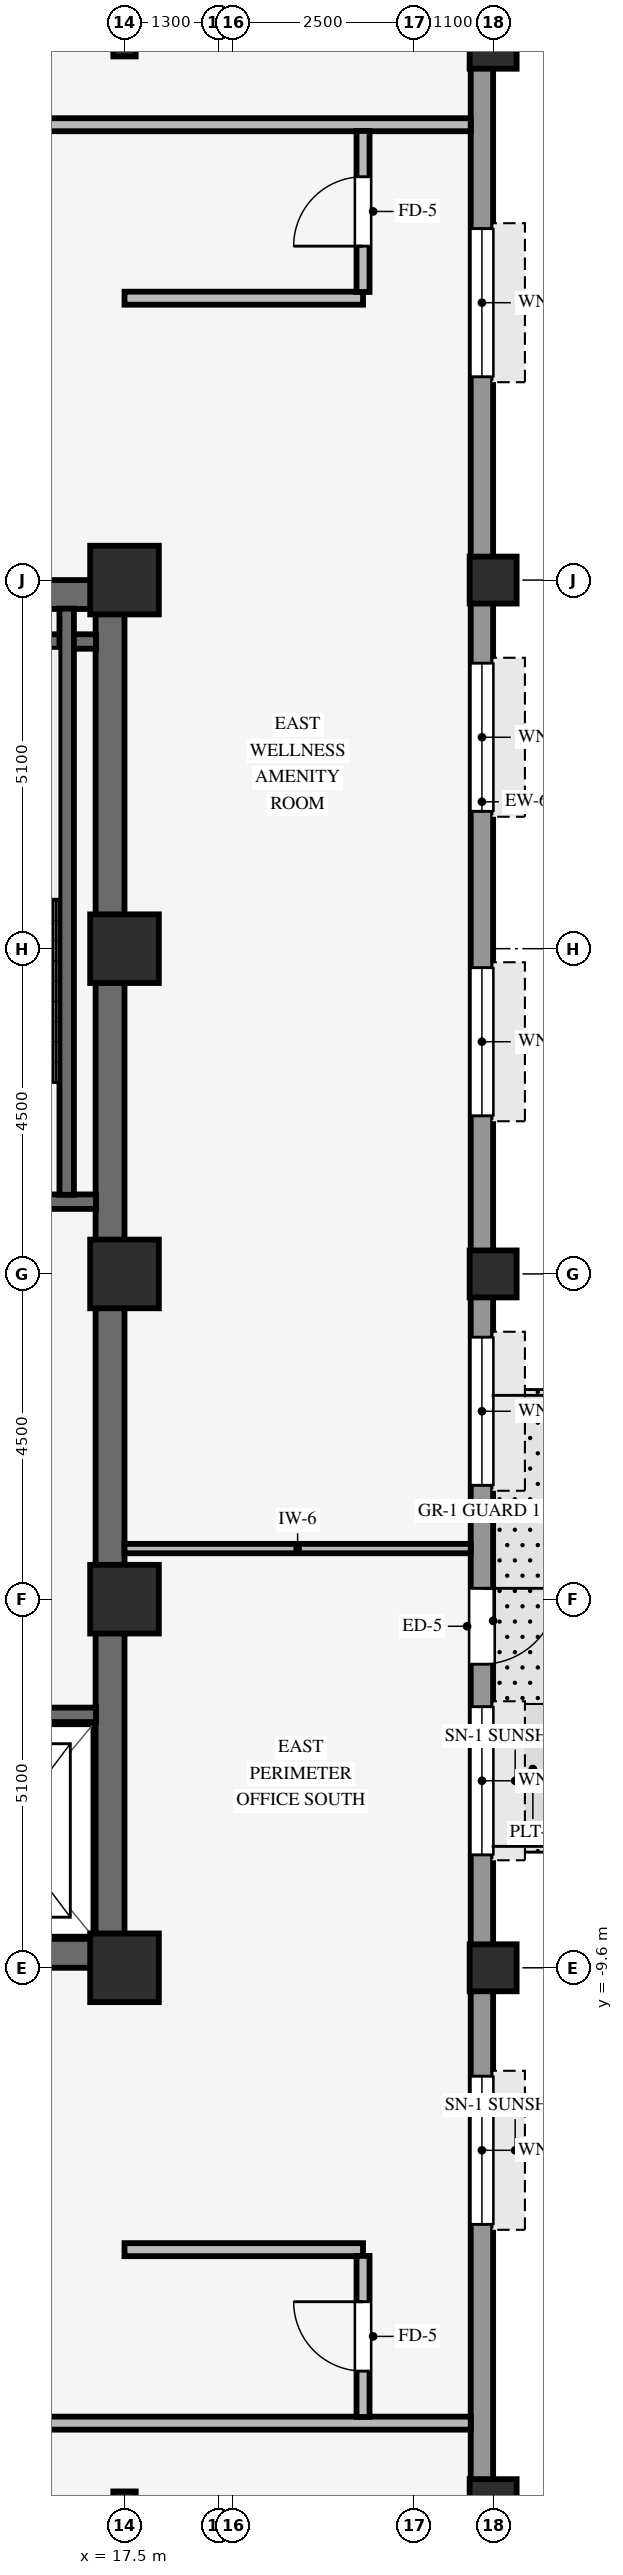
"""IFC4 building model, lengths in metres.
Left out: names, types, materials, properties, quantities, classifications, styles, units other than length and angle.
Written with IfcOpenShell. Run it as: python <this file> out.ifc"""

import sys

from ifc_helpers import new_model, si_unit, direction, frame, frame_2d, origin, origin_2d, place, context, subcontext, project, spatial, rectangle, hollow_rectangle, i_section, extrude, source, transform, mapped, element, fill, save


model = new_model("IFC4")
c1 = context("Model", 3, precision=1e-05, world=origin(), true_north=direction((0.0, 1.0)))
c2 = subcontext(c1, "Body", "Model", "MODEL_VIEW")
j1 = project(units=[si_unit("LENGTHUNIT", "METRE"), si_unit("PLANEANGLEUNIT", "RADIAN")], contexts=[c1])
p1 = place(None, origin())
s1 = spatial("IfcSite", under=j1, at=p1, CompositionType="ELEMENT")
p2 = place(p1, origin())
s2 = spatial("IfcBuilding", under=s1, at=p2, CompositionType="ELEMENT")
p3 = place(p2, frame((0.0, 0.0, 167.65)))
s3 = spatial("IfcBuildingStorey", under=s2, at=p3, CompositionType="ELEMENT", Elevation=167.65)
for number, where, z_axis, x_axis in (
    (1, (9.0, -9.4, 0.0), (0.0, 0.0, 1.0), (1.0, 0.0, 0.0)),
    (2, (9.0, 9.4, 0.0), (0.0, 0.0, 1.0), (1.0, 0.0, 0.0)),
):
    element("IfcWall", number, at=place(p3, frame(where, z_axis=z_axis, x_axis=x_axis)), inside=s3, PredefinedType="SHEAR", context=c2, shape_type="SweptSolid", body=[
        extrude(rectangle(XDim=8.5, YDim=0.4, at=frame_2d((4.25, 0.0))), origin(), (0.0, 0.0, 1.0), 3.37),
    ])
p4 = place(p3, frame((17.3, -9.205, 0.0), z_axis=(0.0, 0.0, 1.0), x_axis=(0.0, 1.0, 0.0)))
e3 = element("IfcWall", 3, at=p4, inside=s3, PredefinedType="SHEAR", context=c2, shape_type="SweptSolid", body=[
    extrude(rectangle(XDim=18.41, YDim=0.4, at=frame_2d((9.205, 0.0))), origin(), (0.0, 0.0, 1.0), 3.37),
])
for number, where, z_axis, x_axis in (
    (4, (17.5, -9.6, 0.0), (0.0, 0.0, 1.0), (1.0, 0.0, 0.0)),
    (5, (17.5, -4.5, 0.0), (0.0, 0.0, 1.0), (1.0, 0.0, 0.0)),
    (6, (17.5, 4.5, 0.0), (0.0, 0.0, 1.0), (1.0, 0.0, 0.0)),
    (7, (17.5, 9.6, 0.0), (0.0, 0.0, 1.0), (1.0, 0.0, 0.0)),
    (8, (17.5, 0.0, 0.0), (0.0, 0.0, 1.0), (1.0, 0.0, 0.0)),
):
    element("IfcColumn", number, at=place(p3, frame(where, z_axis=z_axis, x_axis=x_axis)), inside=s3, PredefinedType="COLUMN", context=c2, shape_type="SweptSolid", body=[
        extrude(rectangle(XDim=0.95, YDim=0.95, at=origin_2d()), origin(), (0.0, 0.0, 1.0), 3.37),
    ])
for number, where, z_axis, x_axis in (
    (9, (22.6, -17.0, -0.4), (0.0, 0.0, 1.0), (1.0, 0.0, 0.0)),
    (10, (22.6, -9.6, -0.4), (0.0, 0.0, 1.0), (1.0, 0.0, 0.0)),
    (11, (22.6, 0.0, -0.4), (0.0, 0.0, 1.0), (1.0, 0.0, 0.0)),
    (12, (22.6, 9.6, -0.4), (0.0, 0.0, 1.0), (1.0, 0.0, 0.0)),
    (13, (22.6, 17.0, -0.4), (0.0, 0.0, 1.0), (1.0, 0.0, 0.0)),
):
    element("IfcColumn", number, at=place(p3, frame(where, z_axis=z_axis, x_axis=x_axis)), inside=s3, PredefinedType="COLUMN", context=c2, shape_type="SweptSolid", body=[
        extrude(hollow_rectangle(XDim=0.65, YDim=0.65, WallThickness=0.04, InnerFilletRadius=0.04, OuterFilletRadius=0.08, at=origin_2d()), origin(), (0.0, 0.0, 1.0), 3.77),
    ])
for number, where, z_axis, x_axis in (
    (14, (17.5, -17.0, 0.0), (0.0, 0.0, 1.0), (1.0, 0.0, 0.0)),
    (15, (17.5, 17.0, 0.0), (0.0, 0.0, 1.0), (1.0, 0.0, 0.0)),
):
    element("IfcColumn", number, at=place(p3, frame(where, z_axis=z_axis, x_axis=x_axis)), inside=s3, PredefinedType="COLUMN", context=c2, shape_type="SweptSolid", body=[
        extrude(i_section(OverallWidth=0.31, OverallDepth=0.31, WebThickness=0.015, FlangeThickness=0.015, FilletRadius=0.015, at=origin_2d()), origin(), (0.0, 0.0, 1.0), 3.37),
    ])
p5 = place(p3, frame((22.445, -20.794, 0.0), z_axis=(0.0, 0.0, 1.0), x_axis=(0.0, 1.0, 0.0)))
e16 = element("IfcWall", 16, at=p5, inside=s3, PredefinedType="STANDARD", context=c2, shape_type="SweptSolid", body=[
    extrude(rectangle(XDim=37.788, YDim=0.31, at=frame_2d((18.894, 0.0))), origin(), (0.0, 0.0, 1.0), 2.705),
])
p6 = place(p5, frame((16.444, 0.0, 0.0), z_axis=(0.0, 0.0, 1.0), x_axis=(-1.0, 0.0, 0.0)))
e17 = element("IfcOpeningElement", 17, at=p6, cuts=e16, PredefinedType="OPENING", context=c2, shape_type="SweptSolid", body=[
    extrude(rectangle(XDim=1.05, YDim=2.1, at=frame_2d((0.525, 1.05))), frame((0.0, 0.165, 0.0), z_axis=(0.0, -1.0, 0.0), x_axis=(1.0, 0.0, 0.0)), (0.0, 0.0, 1.0), 0.33),
])
p7 = place(p5, frame((7.644, 0.0, 0.8)))
e18 = element("IfcOpeningElement", 18, at=p7, cuts=e16, PredefinedType="OPENING", context=c2, shape_type="SweptSolid", body=[
    extrude(rectangle(XDim=2.05, YDim=1.52, at=frame_2d((1.025, 0.76))), frame((0.0, 0.165, 0.0), z_axis=(0.0, -1.0, 0.0), x_axis=(1.0, 0.0, 0.0)), (0.0, 0.0, 1.0), 0.33),
])
p8 = place(p5, frame((12.756, 0.0, 0.8)))
e19 = element("IfcOpeningElement", 19, at=p8, cuts=e16, PredefinedType="OPENING", context=c2, shape_type="SweptSolid", body=[
    extrude(rectangle(XDim=2.05, YDim=1.52, at=frame_2d((1.025, 0.76))), frame((0.0, 0.165, 0.0), z_axis=(0.0, -1.0, 0.0), x_axis=(1.0, 0.0, 0.0)), (0.0, 0.0, 1.0), 0.33),
])
p9 = place(p5, frame((17.869, 0.0, 0.8)))
e20 = element("IfcOpeningElement", 20, at=p9, cuts=e16, PredefinedType="OPENING", context=c2, shape_type="SweptSolid", body=[
    extrude(rectangle(XDim=2.05, YDim=1.52, at=frame_2d((1.025, 0.76))), frame((0.0, 0.165, 0.0), z_axis=(0.0, -1.0, 0.0), x_axis=(1.0, 0.0, 0.0)), (0.0, 0.0, 1.0), 0.33),
])
p10 = place(p5, frame((22.982, 0.0, 0.8)))
e21 = element("IfcOpeningElement", 21, at=p10, cuts=e16, PredefinedType="OPENING", context=c2, shape_type="SweptSolid", body=[
    extrude(rectangle(XDim=2.05, YDim=1.52, at=frame_2d((1.025, 0.76))), frame((0.0, 0.165, 0.0), z_axis=(0.0, -1.0, 0.0), x_axis=(1.0, 0.0, 0.0)), (0.0, 0.0, 1.0), 0.33),
])
p11 = place(p5, frame((27.194, 0.0, 0.8)))
e22 = element("IfcOpeningElement", 22, at=p11, cuts=e16, PredefinedType="OPENING", context=c2, shape_type="SweptSolid", body=[
    extrude(rectangle(XDim=2.05, YDim=1.52, at=frame_2d((1.025, 0.76))), frame((0.0, 0.165, 0.0), z_axis=(0.0, -1.0, 0.0), x_axis=(1.0, 0.0, 0.0)), (0.0, 0.0, 1.0), 0.33),
])
p12 = place(p5, frame((33.207, 0.0, 0.8)))
e23 = element("IfcOpeningElement", 23, at=p12, cuts=e16, PredefinedType="OPENING", context=c2, shape_type="SweptSolid", body=[
    extrude(rectangle(XDim=2.05, YDim=1.52, at=frame_2d((1.025, 0.76))), frame((0.0, 0.165, 0.0), z_axis=(0.0, -1.0, 0.0), x_axis=(1.0, 0.0, 0.0)), (0.0, 0.0, 1.0), 0.33),
])
for number, where, z_axis, x_axis in (
    (24, (13.535, 1.0, 0.0), (0.0, 0.0, 1.0), (1.0, 0.0, 0.0)),
    (25, (13.535, 8.75, 0.0), (0.0, 0.0, 1.0), (1.0, 0.0, 0.0)),
):
    element("IfcWall", number, at=place(p3, frame(where, z_axis=z_axis, x_axis=x_axis)), inside=s3, PredefinedType="SHEAR", context=c2, shape_type="SweptSolid", body=[
        extrude(rectangle(XDim=3.57, YDim=0.2, at=frame_2d((1.785, 0.0))), origin(), (0.0, 0.0, 1.0), 3.37),
    ])
p13 = place(p3, frame((16.7, 1.095, 0.0), z_axis=(0.0, 0.0, 1.0), x_axis=(0.0, 1.0, 0.0)))
e26 = element("IfcWall", 26, at=p13, inside=s3, PredefinedType="SHEAR", context=c2, shape_type="SweptSolid", body=[
    extrude(rectangle(XDim=8.11, YDim=0.2, at=frame_2d((4.055, 0.0))), origin(), (0.0, 0.0, 1.0), 3.37),
])
p14 = place(p3, frame((14.645, -6.1, 0.0), z_axis=(0.0, 0.0, 1.0), x_axis=(1.0, 0.0, 0.0)))
e27 = element("IfcWall", 27, at=p14, inside=s3, PredefinedType="SHEAR", context=c2, shape_type="SweptSolid", body=[
    extrude(rectangle(XDim=2.46, YDim=0.2, at=frame_2d((1.23, 0.0))), origin(), (0.0, 0.0, 1.0), 3.37),
])
p15 = place(p3, frame((-26.09, -15.9, 0.0), z_axis=(0.0, 0.0, 1.0), x_axis=(1.0, 0.0, 0.0)))
e28 = element("IfcWall", 28, at=p15, inside=s3, PredefinedType="PARTITIONING", context=c2, shape_type="SweptSolid", body=[
    extrude(rectangle(XDim=48.38, YDim=0.18, at=frame_2d((24.19, 0.0))), origin(), (0.0, 0.0, 1.0), 3.36),
])
p16 = place(p15, frame((23.31, 0.0, 0.0)))
e29 = element("IfcOpeningElement", 29, at=p16, cuts=e28, PredefinedType="OPENING", context=c2, shape_type="SweptSolid", body=[
    extrude(rectangle(XDim=0.96, YDim=2.1, at=frame_2d((0.48, 1.05))), frame((0.0, 0.1, 0.0), z_axis=(0.0, -1.0, 0.0), x_axis=(1.0, 0.0, 0.0)), (0.0, 0.0, 1.0), 0.2),
])
p17 = place(p15, frame((11.16, 0.0, 0.0)))
e30 = element("IfcOpeningElement", 30, at=p17, cuts=e28, PredefinedType="OPENING", context=c2, shape_type="SweptSolid", body=[
    extrude(rectangle(XDim=0.96, YDim=2.1, at=frame_2d((0.48, 1.05))), frame((0.0, 0.1, 0.0), z_axis=(0.0, -1.0, 0.0), x_axis=(1.0, 0.0, 0.0)), (0.0, 0.0, 1.0), 0.2),
])
p18 = place(p3, frame((17.5, -13.5, 0.0), z_axis=(0.0, 0.0, 1.0), x_axis=(1.0, 0.0, 0.0)))
e31 = element("IfcWall", 31, at=p18, inside=s3, PredefinedType="PARTITIONING", context=c2, shape_type="SweptSolid", body=[
    extrude(rectangle(XDim=3.3, YDim=0.18, at=frame_2d((1.65, 0.0))), origin(), (0.0, 0.0, 1.0), 3.008),
])
p19 = place(p3, frame((17.5, -3.8, 0.0), z_axis=(0.0, 0.0, 1.0), x_axis=(1.0, 0.0, 0.0)))
e32 = element("IfcWall", 32, at=p19, inside=s3, PredefinedType="PARTITIONING", context=c2, shape_type="SweptSolid", body=[
    extrude(rectangle(XDim=4.79, YDim=0.13, at=frame_2d((2.395, 0.0))), origin(), (0.0, 0.0, 1.0), 3.36),
])
p20 = place(p3, frame((17.5, 13.5, 0.0), z_axis=(0.0, 0.0, 1.0), x_axis=(1.0, 0.0, 0.0)))
e33 = element("IfcWall", 33, at=p20, inside=s3, PredefinedType="PARTITIONING", context=c2, shape_type="SweptSolid", body=[
    extrude(rectangle(XDim=3.3, YDim=0.18, at=frame_2d((1.65, 0.0))), origin(), (0.0, 0.0, 1.0), 3.008),
])
p21 = place(p3, frame((-26.09, 15.9, 0.0), z_axis=(0.0, 0.0, 1.0), x_axis=(1.0, 0.0, 0.0)))
e34 = element("IfcWall", 34, at=p21, inside=s3, PredefinedType="PARTITIONING", context=c2, shape_type="SweptSolid", body=[
    extrude(rectangle(XDim=48.38, YDim=0.18, at=frame_2d((24.19, 0.0))), origin(), (0.0, 0.0, 1.0), 3.36),
])
p22 = place(p21, frame((18.12, 0.0, 0.0)))
e35 = element("IfcOpeningElement", 35, at=p22, cuts=e34, PredefinedType="OPENING", context=c2, shape_type="SweptSolid", body=[
    extrude(rectangle(XDim=0.96, YDim=2.1, at=frame_2d((0.48, 1.05))), frame((0.0, 0.1, 0.0), z_axis=(0.0, -1.0, 0.0), x_axis=(1.0, 0.0, 0.0)), (0.0, 0.0, 1.0), 0.2),
])
p23 = place(p21, frame((40.915, 0.0, 0.0)))
e36 = element("IfcOpeningElement", 36, at=p23, cuts=e34, PredefinedType="OPENING", context=c2, shape_type="SweptSolid", body=[
    extrude(rectangle(XDim=0.96, YDim=2.1, at=frame_2d((0.48, 1.05))), frame((0.0, 0.1, 0.0), z_axis=(0.0, -1.0, 0.0), x_axis=(1.0, 0.0, 0.0)), (0.0, 0.0, 1.0), 0.2),
])
p24 = place(p21, frame((28.585, 0.0, 0.0)))
e37 = element("IfcOpeningElement", 37, at=p24, cuts=e34, PredefinedType="OPENING", context=c2, shape_type="SweptSolid", body=[
    extrude(rectangle(XDim=0.96, YDim=2.1, at=frame_2d((0.48, 1.05))), frame((0.0, 0.1, 0.0), z_axis=(0.0, -1.0, 0.0), x_axis=(1.0, 0.0, 0.0)), (0.0, 0.0, 1.0), 0.2),
])
p25 = place(p21, frame((9.595, 0.0, 0.0)))
e38 = element("IfcOpeningElement", 38, at=p25, cuts=e34, PredefinedType="OPENING", context=c2, shape_type="SweptSolid", body=[
    extrude(rectangle(XDim=0.96, YDim=2.1, at=frame_2d((0.48, 1.05))), frame((0.0, 0.1, 0.0), z_axis=(0.0, -1.0, 0.0), x_axis=(1.0, 0.0, 0.0)), (0.0, 0.0, 1.0), 0.2),
])
p26 = place(p3, frame((20.8, -15.814, 0.0), z_axis=(0.0, 0.0, 1.0), x_axis=(0.0, 1.0, 0.0)))
e39 = element("IfcWall", 39, at=p26, inside=s3, PredefinedType="PARTITIONING", context=c2, shape_type="SweptSolid", body=[
    extrude(rectangle(XDim=2.228, YDim=0.18, at=frame_2d((1.114, 0.0))), origin(), (0.0, 0.0, 1.0), 3.36),
])
p27 = place(p26, frame((0.634, 0.0, 0.0)))
e40 = element("IfcOpeningElement", 40, at=p27, cuts=e39, PredefinedType="OPENING", context=c2, shape_type="SweptSolid", body=[
    extrude(rectangle(XDim=0.96, YDim=2.1, at=frame_2d((0.48, 1.05))), frame((0.0, 0.1, 0.0), z_axis=(0.0, -1.0, 0.0), x_axis=(1.0, 0.0, 0.0)), (0.0, 0.0, 1.0), 0.2),
])
p28 = place(p3, frame((20.8, 13.586, 0.0), z_axis=(0.0, 0.0, 1.0), x_axis=(0.0, 1.0, 0.0)))
e41 = element("IfcWall", 41, at=p28, inside=s3, PredefinedType="PARTITIONING", context=c2, shape_type="SweptSolid", body=[
    extrude(rectangle(XDim=2.228, YDim=0.18, at=frame_2d((1.114, 0.0))), origin(), (0.0, 0.0, 1.0), 3.36),
])
p29 = place(p28, frame((0.634, 0.0, 0.0)))
e42 = element("IfcOpeningElement", 42, at=p29, cuts=e41, PredefinedType="OPENING", context=c2, shape_type="SweptSolid", body=[
    extrude(rectangle(XDim=0.96, YDim=2.1, at=frame_2d((0.48, 1.05))), frame((0.0, 0.1, 0.0), z_axis=(0.0, -1.0, 0.0), x_axis=(1.0, 0.0, 0.0)), (0.0, 0.0, 1.0), 0.2),
])
m1 = source(origin(), c2, "Body", "SweptSolid", [
    extrude(rectangle(XDim=1.05, YDim=2.1, at=frame_2d((0.525, 1.05))), frame((0.0, 0.025, 0.0), z_axis=(0.0, -1.0, 0.0), x_axis=(1.0, 0.0, 0.0)), (0.0, 0.0, 1.0), 0.05),
])
p30 = place(p6, origin())
e43 = element("IfcDoor", 43, at=p30, inside=s3, OperationType="SINGLE_SWING_LEFT", PredefinedType="DOOR", context=c2, shape_type="MappedRepresentation", body=[
    mapped(m1, transform((0.0, 0.0, 0.0), scale=1.0)),
])
fill(e17, e43)
m2 = source(origin(), c2, "Body", "SweptSolid", [
    extrude(rectangle(XDim=2.05, YDim=1.52, at=frame_2d((1.025, 0.76))), frame((0.0, 0.03, 0.0), z_axis=(0.0, -1.0, 0.0), x_axis=(1.0, 0.0, 0.0)), (0.0, 0.0, 1.0), 0.06),
])
p31 = place(p7, origin())
e44 = element("IfcWindow", 44, at=p31, inside=s3, PartitioningType="SINGLE_PANEL", PredefinedType="WINDOW", context=c2, shape_type="MappedRepresentation", body=[
    mapped(m2, transform((0.0, 0.0, 0.0), scale=1.0)),
])
fill(e18, e44)
p32 = place(p8, origin())
e45 = element("IfcWindow", 45, at=p32, inside=s3, PartitioningType="SINGLE_PANEL", PredefinedType="WINDOW", context=c2, shape_type="MappedRepresentation", body=[
    mapped(m2, transform((0.0, 0.0, 0.0), scale=1.0)),
])
fill(e19, e45)
p33 = place(p9, origin())
e46 = element("IfcWindow", 46, at=p33, inside=s3, PartitioningType="SINGLE_PANEL", PredefinedType="WINDOW", context=c2, shape_type="MappedRepresentation", body=[
    mapped(m2, transform((0.0, 0.0, 0.0), scale=1.0)),
])
fill(e20, e46)
p34 = place(p10, origin())
e47 = element("IfcWindow", 47, at=p34, inside=s3, PartitioningType="SINGLE_PANEL", PredefinedType="WINDOW", context=c2, shape_type="MappedRepresentation", body=[
    mapped(m2, transform((0.0, 0.0, 0.0), scale=1.0)),
])
fill(e21, e47)
p35 = place(p11, origin())
e48 = element("IfcWindow", 48, at=p35, inside=s3, PartitioningType="SINGLE_PANEL", PredefinedType="WINDOW", context=c2, shape_type="MappedRepresentation", body=[
    mapped(m2, transform((0.0, 0.0, 0.0), scale=1.0)),
])
fill(e22, e48)
p36 = place(p12, origin())
e49 = element("IfcWindow", 49, at=p36, inside=s3, PartitioningType="SINGLE_PANEL", PredefinedType="WINDOW", context=c2, shape_type="MappedRepresentation", body=[
    mapped(m2, transform((0.0, 0.0, 0.0), scale=1.0)),
])
fill(e23, e49)
m3 = source(origin(), c2, "Body", "SweptSolid", [
    extrude(rectangle(XDim=0.96, YDim=2.1, at=frame_2d((0.48, 1.05))), frame((0.0, 0.025, 0.0), z_axis=(0.0, -1.0, 0.0), x_axis=(1.0, 0.0, 0.0)), (0.0, 0.0, 1.0), 0.05),
])
p37 = place(p27, origin())
e50 = element("IfcDoor", 50, at=p37, inside=s3, OperationType="SINGLE_SWING_RIGHT", PredefinedType="DOOR", context=c2, shape_type="MappedRepresentation", body=[
    mapped(m3, transform((0.0, 0.0, 0.0), scale=1.0)),
])
fill(e40, e50)
p38 = place(p29, origin())
e51 = element("IfcDoor", 51, at=p38, inside=s3, OperationType="SINGLE_SWING_LEFT", PredefinedType="DOOR", context=c2, shape_type="MappedRepresentation", body=[
    mapped(m3, transform((0.0, 0.0, 0.0), scale=1.0)),
])
fill(e42, e51)
save(model, sys.argv[1])
